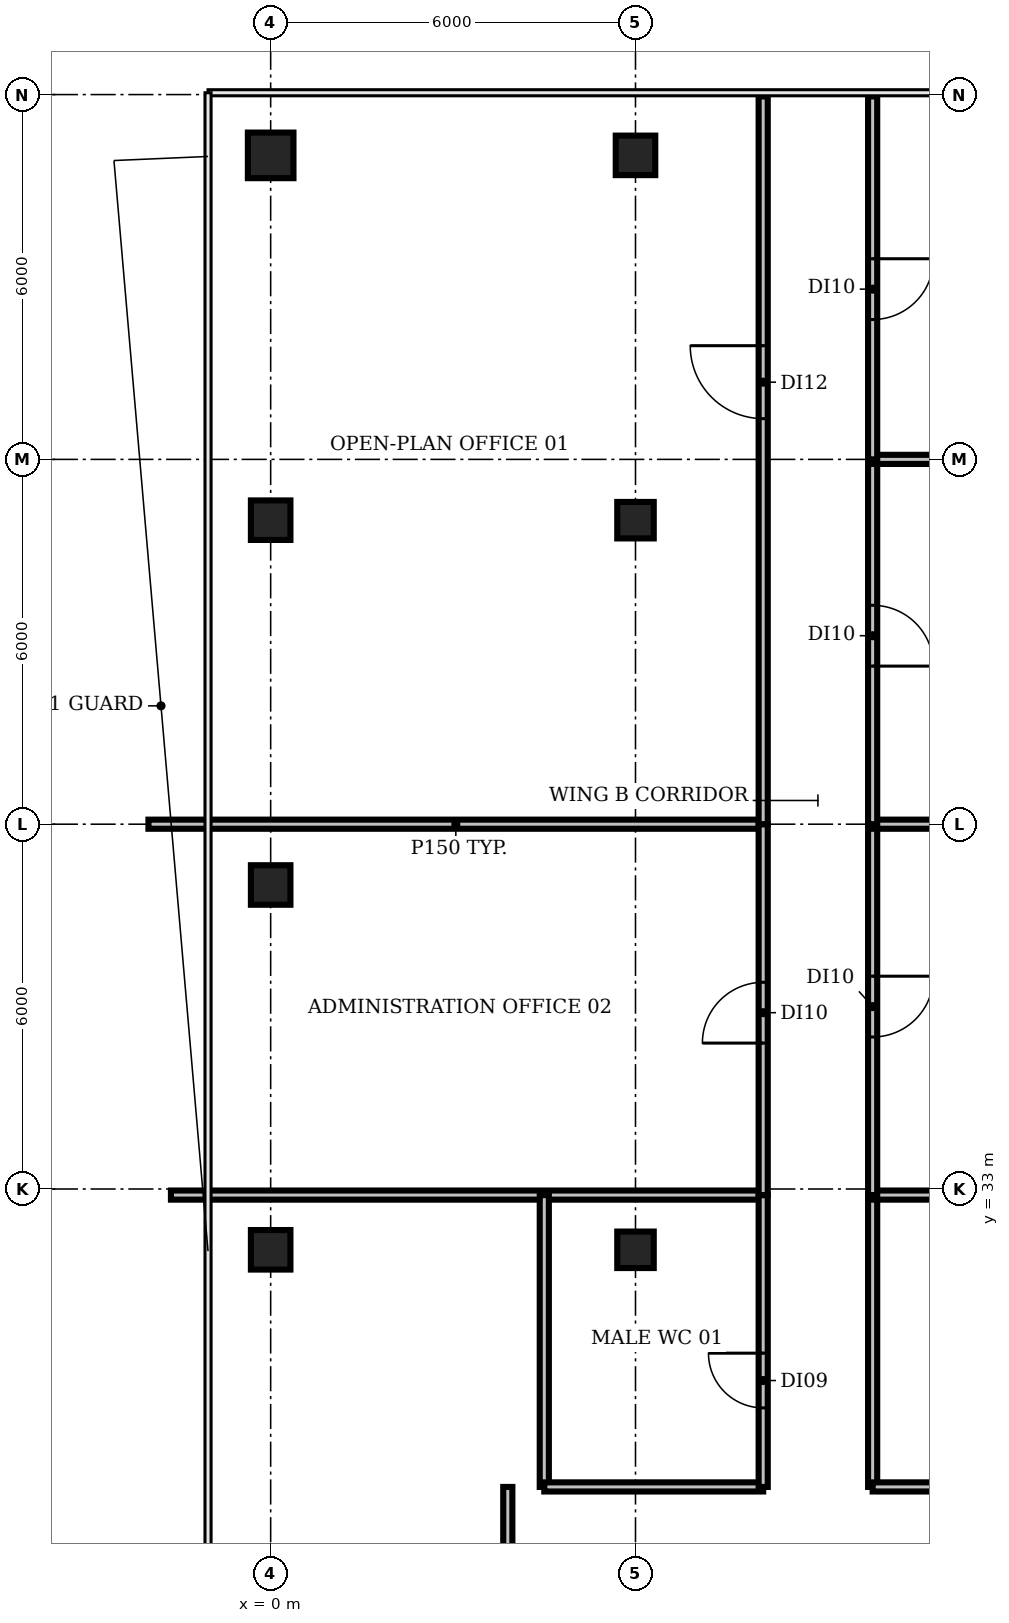
"""IFC4 building model, lengths in metres.
Left out: names, types, materials, properties, quantities, classifications, styles, units other than length and angle.
Written with IfcOpenShell. Run it as: python <this file> out.ifc"""

import sys

from ifc_helpers import new_model, si_unit, direction, frame, frame_2d, origin, origin_2d, place, context, subcontext, project, spatial, rectangle, circle, extrude, element, fill, save


model = new_model("IFC4")
c1 = context("Model", 3, precision=1e-05, world=origin(), true_north=direction((0.0, 1.0)))
c2 = subcontext(c1, "Body", "Model", "MODEL_VIEW")
j1 = project(units=[si_unit("LENGTHUNIT", "METRE"), si_unit("PLANEANGLEUNIT", "RADIAN")], contexts=[c1])
p1 = place(None, origin())
s1 = spatial("IfcSite", under=j1, at=p1, CompositionType="ELEMENT")
p2 = place(p1, origin())
s2 = spatial("IfcBuilding", under=s1, at=p2, CompositionType="ELEMENT")
p3 = place(p2, frame((0.0, 0.0, 318.8)))
s3 = spatial("IfcBuildingStorey", under=s2, at=p3, CompositionType="ELEMENT", Elevation=318.8)
for number, where, z_axis, x_axis in (
    (1, (0.0, 32.0, 0.0), (0.0, 0.0, 1.0), (1.0, 0.0, 0.0)),
    (2, (0.0, 38.0, 0.0), (0.0, 0.0, 1.0), (1.0, 0.0, 0.0)),
    (3, (0.0, 44.0, 0.0), (0.0, 0.0, 1.0), (1.0, 0.0, 0.0)),
):
    element("IfcColumn", number, at=place(p3, frame(where, z_axis=z_axis, x_axis=x_axis)), inside=s3, PredefinedType="COLUMN", context=c2, shape_type="SweptSolid", body=[
        extrude(rectangle(XDim=0.65, YDim=0.65, at=origin_2d()), origin(), (0.0, 0.0, 1.0), 3.9),
    ])
p4 = place(p3, frame((0.0, 50.0, 0.0), z_axis=(0.0, 0.0, 1.0), x_axis=(1.0, 0.0, 0.0)))
e4 = element("IfcColumn", 4, at=p4, inside=s3, PredefinedType="COLUMN", context=c2, shape_type="SweptSolid", body=[
    extrude(circle(Radius=0.375, at=origin_2d()), origin(), (0.0, 0.0, 1.0), 3.9),
])
for number, where, z_axis, x_axis in (
    (5, (6.0, 32.0, 0.0), (0.0, 0.0, 1.0), (1.0, 0.0, 0.0)),
    (6, (6.0, 44.0, 0.0), (0.0, 0.0, 1.0), (1.0, 0.0, 0.0)),
):
    element("IfcColumn", number, at=place(p3, frame(where, z_axis=z_axis, x_axis=x_axis)), inside=s3, PredefinedType="COLUMN", context=c2, shape_type="SweptSolid", body=[
        extrude(rectangle(XDim=0.6, YDim=0.6, at=origin_2d()), origin(), (0.0, 0.0, 1.0), 3.9),
    ])
p5 = place(p3, frame((6.0, 50.0, 0.0), z_axis=(0.0, 0.0, 1.0), x_axis=(1.0, 0.0, 0.0)))
e7 = element("IfcColumn", 7, at=p5, inside=s3, PredefinedType="COLUMN", context=c2, shape_type="SweptSolid", body=[
    extrude(rectangle(XDim=0.65, YDim=0.65, at=origin_2d()), origin(), (0.0, 0.0, 1.0), 3.9),
])
p6 = place(p3, frame((-2.01, 39.0, 0.0), z_axis=(0.0, 0.0, 1.0), x_axis=(1.0, 0.0, 0.0)))
e8 = element("IfcWall", 8, at=p6, inside=s3, PredefinedType="PARTITIONING", context=c2, shape_type="SweptSolid", body=[
    extrude(rectangle(XDim=10.11, YDim=0.15, at=frame_2d((5.055, 0.0))), origin(), (0.0, 0.0, 1.0), 2.95),
])
p7 = place(p3, frame((-1.64, 32.9, 0.0), z_axis=(0.0, 0.0, 1.0), x_axis=(1.0, 0.0, 0.0)))
e9 = element("IfcWall", 9, at=p7, inside=s3, PredefinedType="PARTITIONING", context=c2, shape_type="SweptSolid", body=[
    extrude(rectangle(XDim=9.74, YDim=0.15, at=frame_2d((4.87, 0.0))), origin(), (0.0, 0.0, 1.0), 2.95),
])
p8 = place(p3, frame((3.9, 22.5, 0.0), z_axis=(0.0, 0.0, 1.0), x_axis=(0.0, 1.0, 0.0)))
e10 = element("IfcWall", 10, at=p8, inside=s3, PredefinedType="PARTITIONING", context=c2, shape_type="SweptSolid", body=[
    extrude(rectangle(XDim=5.6, YDim=0.15, at=frame_2d((2.8, 0.0))), origin(), (0.0, 0.0, 1.0), 2.95),
])
p9 = place(p3, frame((4.5, 28.1, 0.0), z_axis=(0.0, 0.0, 1.0), x_axis=(0.0, 1.0, 0.0)))
e11 = element("IfcWall", 11, at=p9, inside=s3, PredefinedType="PARTITIONING", context=c2, shape_type="SweptSolid", body=[
    extrude(rectangle(XDim=4.8, YDim=0.15, at=frame_2d((2.4, 0.0))), origin(), (0.0, 0.0, 1.0), 2.95),
])
p10 = place(p3, frame((4.5, 28.1, 0.0), z_axis=(0.0, 0.0, 1.0), x_axis=(1.0, 0.0, 0.0)))
e12 = element("IfcWall", 12, at=p10, inside=s3, PredefinedType="PARTITIONING", context=c2, shape_type="SweptSolid", body=[
    extrude(rectangle(XDim=3.6, YDim=0.15, at=frame_2d((1.8, 0.0))), origin(), (0.0, 0.0, 1.0), 2.95),
])
p11 = place(p3, frame((8.1, 28.1, 0.0), z_axis=(0.0, 0.0, 1.0), x_axis=(0.0, 1.0, 0.0)))
e13 = element("IfcWall", 13, at=p11, inside=s3, PredefinedType="PARTITIONING", context=c2, shape_type="SweptSolid", body=[
    extrude(rectangle(XDim=4.8, YDim=0.15, at=frame_2d((2.4, 0.0))), origin(), (0.0, 0.0, 1.0), 2.95),
])
p12 = place(p11, frame((1.3, 0.0, 0.0)))
e14 = element("IfcOpeningElement", 14, at=p12, cuts=e13, PredefinedType="OPENING", context=c2, shape_type="SweptSolid", body=[
    extrude(rectangle(XDim=0.9, YDim=2.1, at=frame_2d((0.45, 1.05))), frame((0.0, 0.085, 0.0), z_axis=(0.0, -1.0, 0.0), x_axis=(1.0, 0.0, 0.0)), (0.0, 0.0, 1.0), 0.17),
])
p13 = place(p3, frame((8.1, 32.9, 0.0), z_axis=(0.0, 0.0, 1.0), x_axis=(0.0, 1.0, 0.0)))
e15 = element("IfcWall", 15, at=p13, inside=s3, PredefinedType="PARTITIONING", context=c2, shape_type="SweptSolid", body=[
    extrude(rectangle(XDim=6.1, YDim=0.15, at=frame_2d((3.05, 0.0))), origin(), (0.0, 0.0, 1.0), 2.95),
])
p14 = place(p13, frame((2.5, 0.0, 0.0)))
e16 = element("IfcOpeningElement", 16, at=p14, cuts=e15, PredefinedType="OPENING", context=c2, shape_type="SweptSolid", body=[
    extrude(rectangle(XDim=1.0, YDim=2.1, at=frame_2d((0.5, 1.05))), frame((0.0, 0.085, 0.0), z_axis=(0.0, -1.0, 0.0), x_axis=(1.0, 0.0, 0.0)), (0.0, 0.0, 1.0), 0.17),
])
p15 = place(p3, frame((8.1, 39.0, 0.0), z_axis=(0.0, 0.0, 1.0), x_axis=(0.0, 1.0, 0.0)))
e17 = element("IfcWall", 17, at=p15, inside=s3, PredefinedType="PARTITIONING", context=c2, shape_type="SweptSolid", body=[
    extrude(rectangle(XDim=11.97, YDim=0.15, at=frame_2d((5.985, 0.0))), origin(), (0.0, 0.0, 1.0), 2.95),
])
p16 = place(p15, frame((6.67, 0.0, 0.0)))
e18 = element("IfcOpeningElement", 18, at=p16, cuts=e17, PredefinedType="OPENING", context=c2, shape_type="SweptSolid", body=[
    extrude(rectangle(XDim=1.2, YDim=2.1, at=frame_2d((0.6, 1.05))), frame((0.0, 0.085, 0.0), z_axis=(0.0, -1.0, 0.0), x_axis=(1.0, 0.0, 0.0)), (0.0, 0.0, 1.0), 0.17),
])
p17 = place(p3, frame((9.9, 28.1, 0.0), z_axis=(0.0, 0.0, 1.0), x_axis=(0.0, 1.0, 0.0)))
e19 = element("IfcWall", 19, at=p17, inside=s3, PredefinedType="PARTITIONING", context=c2, shape_type="SweptSolid", body=[
    extrude(rectangle(XDim=4.8, YDim=0.15, at=frame_2d((2.4, 0.0))), origin(), (0.0, 0.0, 1.0), 2.95),
])
p18 = place(p3, frame((9.9, 28.1, 0.0), z_axis=(0.0, 0.0, 1.0), x_axis=(1.0, 0.0, 0.0)))
e20 = element("IfcWall", 20, at=p18, inside=s3, PredefinedType="PARTITIONING", context=c2, shape_type="SweptSolid", body=[
    extrude(rectangle(XDim=4.5, YDim=0.15, at=frame_2d((2.25, 0.0))), origin(), (0.0, 0.0, 1.0), 2.95),
])
p19 = place(p3, frame((9.9, 32.9, 0.0), z_axis=(0.0, 0.0, 1.0), x_axis=(1.0, 0.0, 0.0)))
e21 = element("IfcWall", 21, at=p19, inside=s3, PredefinedType="PARTITIONING", context=c2, shape_type="SweptSolid", body=[
    extrude(rectangle(XDim=15.08, YDim=0.15, at=frame_2d((7.54, 0.0))), origin(), (0.0, 0.0, 1.0), 2.95),
])
p20 = place(p3, frame((9.9, 39.0, 0.0), z_axis=(0.0, 0.0, 1.0), x_axis=(0.0, -1.0, 0.0)))
e22 = element("IfcWall", 22, at=p20, inside=s3, PredefinedType="PARTITIONING", context=c2, shape_type="SweptSolid", body=[
    extrude(rectangle(XDim=6.1, YDim=0.15, at=frame_2d((3.05, 0.0))), origin(), (0.0, 0.0, 1.0), 2.95),
])
p21 = place(p20, frame((2.5, 0.0, 0.0)))
e23 = element("IfcOpeningElement", 23, at=p21, cuts=e22, PredefinedType="OPENING", context=c2, shape_type="SweptSolid", body=[
    extrude(rectangle(XDim=1.0, YDim=2.1, at=frame_2d((0.5, 1.05))), frame((0.0, 0.085, 0.0), z_axis=(0.0, -1.0, 0.0), x_axis=(1.0, 0.0, 0.0)), (0.0, 0.0, 1.0), 0.17),
])
p22 = place(p3, frame((9.9, 39.0, 0.0), z_axis=(0.0, 0.0, 1.0), x_axis=(1.0, 0.0, 0.0)))
e24 = element("IfcWall", 24, at=p22, inside=s3, PredefinedType="PARTITIONING", context=c2, shape_type="SweptSolid", body=[
    extrude(rectangle(XDim=15.075, YDim=0.15, at=frame_2d((7.538, 0.0))), origin(), (0.0, 0.0, 1.0), 2.95),
])
p23 = place(p3, frame((9.9, 45.0, 0.0), z_axis=(0.0, 0.0, 1.0), x_axis=(0.0, -1.0, 0.0)))
e25 = element("IfcWall", 25, at=p23, inside=s3, PredefinedType="PARTITIONING", context=c2, shape_type="SweptSolid", body=[
    extrude(rectangle(XDim=6.0, YDim=0.15, at=frame_2d((3.0, 0.0))), origin(), (0.0, 0.0, 1.0), 2.95),
])
p24 = place(p23, frame((2.4, 0.0, 0.0)))
e26 = element("IfcOpeningElement", 26, at=p24, cuts=e25, PredefinedType="OPENING", context=c2, shape_type="SweptSolid", body=[
    extrude(rectangle(XDim=1.0, YDim=2.1, at=frame_2d((0.5, 1.05))), frame((0.0, 0.085, 0.0), z_axis=(0.0, -1.0, 0.0), x_axis=(1.0, 0.0, 0.0)), (0.0, 0.0, 1.0), 0.17),
])
p25 = place(p3, frame((9.9, 45.0, 0.0), z_axis=(0.0, 0.0, 1.0), x_axis=(1.0, 0.0, 0.0)))
e27 = element("IfcWall", 27, at=p25, inside=s3, PredefinedType="PARTITIONING", context=c2, shape_type="SweptSolid", body=[
    extrude(rectangle(XDim=15.075, YDim=0.15, at=frame_2d((7.538, 0.0))), origin(), (0.0, 0.0, 1.0), 2.95),
])
p26 = place(p3, frame((9.9, 50.97, 0.0), z_axis=(0.0, 0.0, 1.0), x_axis=(0.0, -1.0, 0.0)))
e28 = element("IfcWall", 28, at=p26, inside=s3, PredefinedType="PARTITIONING", context=c2, shape_type="SweptSolid", body=[
    extrude(rectangle(XDim=5.97, YDim=0.15, at=frame_2d((2.985, 0.0))), origin(), (0.0, 0.0, 1.0), 2.95),
])
p27 = place(p26, frame((2.67, 0.0, 0.0)))
e29 = element("IfcOpeningElement", 29, at=p27, cuts=e28, PredefinedType="OPENING", context=c2, shape_type="SweptSolid", body=[
    extrude(rectangle(XDim=1.0, YDim=2.1, at=frame_2d((0.5, 1.05))), frame((0.0, 0.085, 0.0), z_axis=(0.0, -1.0, 0.0), x_axis=(1.0, 0.0, 0.0)), (0.0, 0.0, 1.0), 0.17),
])
p28 = place(p12, origin())
e30 = element("IfcDoor", 30, at=p28, inside=s3, OperationType="SINGLE_SWING_RIGHT", PredefinedType="DOOR", context=c2, shape_type="SweptSolid", body=[
    extrude(rectangle(XDim=0.9, YDim=2.1, at=frame_2d((0.45, 1.05))), frame((0.0, 0.025, 0.0), z_axis=(0.0, -1.0, 0.0), x_axis=(1.0, 0.0, 0.0)), (0.0, 0.0, 1.0), 0.05),
])
fill(e14, e30)
p29 = place(p14, origin())
e31 = element("IfcDoor", 31, at=p29, inside=s3, OperationType="SINGLE_SWING_LEFT", PredefinedType="DOOR", context=c2, shape_type="SweptSolid", body=[
    extrude(rectangle(XDim=1.0, YDim=2.1, at=frame_2d((0.5, 1.05))), frame((0.0, 0.025, 0.0), z_axis=(0.0, -1.0, 0.0), x_axis=(1.0, 0.0, 0.0)), (0.0, 0.0, 1.0), 0.05),
])
fill(e16, e31)
p30 = place(p16, origin())
e32 = element("IfcDoor", 32, at=p30, inside=s3, OperationType="SINGLE_SWING_RIGHT", PredefinedType="DOOR", context=c2, shape_type="SweptSolid", body=[
    extrude(rectangle(XDim=1.2, YDim=2.1, at=frame_2d((0.6, 1.05))), frame((0.0, 0.025, 0.0), z_axis=(0.0, -1.0, 0.0), x_axis=(1.0, 0.0, 0.0)), (0.0, 0.0, 1.0), 0.05),
])
fill(e18, e32)
p31 = place(p21, origin())
e33 = element("IfcDoor", 33, at=p31, inside=s3, OperationType="SINGLE_SWING_LEFT", PredefinedType="DOOR", context=c2, shape_type="SweptSolid", body=[
    extrude(rectangle(XDim=1.0, YDim=2.1, at=frame_2d((0.5, 1.05))), frame((0.0, 0.025, 0.0), z_axis=(0.0, -1.0, 0.0), x_axis=(1.0, 0.0, 0.0)), (0.0, 0.0, 1.0), 0.05),
])
fill(e23, e33)
p32 = place(p24, origin())
e34 = element("IfcDoor", 34, at=p32, inside=s3, OperationType="SINGLE_SWING_RIGHT", PredefinedType="DOOR", context=c2, shape_type="SweptSolid", body=[
    extrude(rectangle(XDim=1.0, YDim=2.1, at=frame_2d((0.5, 1.05))), frame((0.0, 0.025, 0.0), z_axis=(0.0, -1.0, 0.0), x_axis=(1.0, 0.0, 0.0)), (0.0, 0.0, 1.0), 0.05),
])
fill(e26, e34)
p33 = place(p27, origin())
e35 = element("IfcDoor", 35, at=p33, inside=s3, OperationType="SINGLE_SWING_LEFT", PredefinedType="DOOR", context=c2, shape_type="SweptSolid", body=[
    extrude(rectangle(XDim=1.0, YDim=2.1, at=frame_2d((0.5, 1.05))), frame((0.0, 0.025, 0.0), z_axis=(0.0, -1.0, 0.0), x_axis=(1.0, 0.0, 0.0)), (0.0, 0.0, 1.0), 0.05),
])
fill(e29, e35)
save(model, sys.argv[1])
